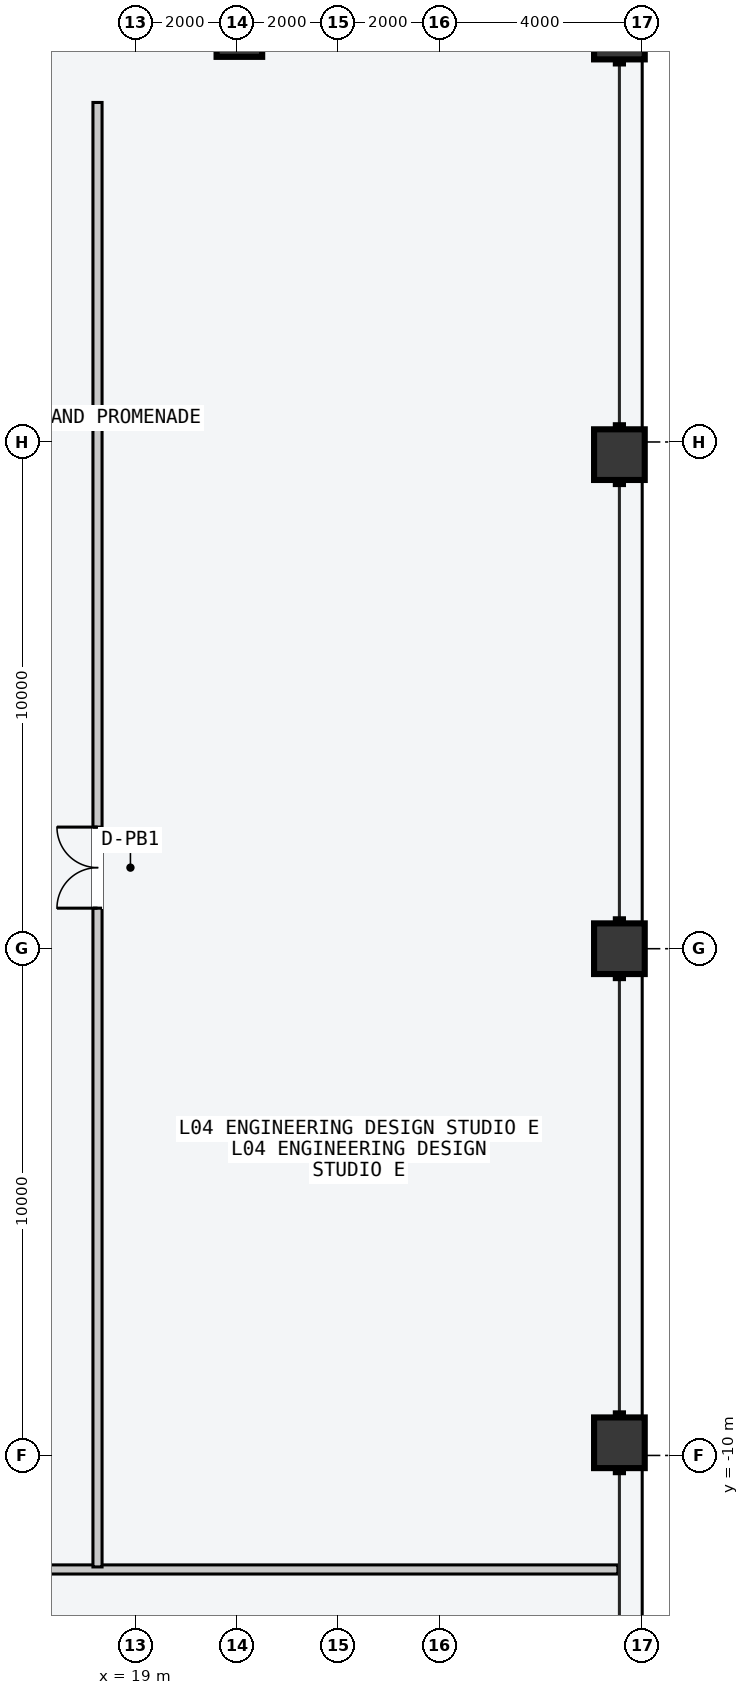
"""IFC4 building model, lengths in metres.
Left out: names, types, materials, properties, quantities, classifications, styles, units other than length and angle.
Written with IfcOpenShell. Run it as: python <this file> out.ifc"""

import sys

from ifc_helpers import new_model, si_unit, direction, frame, frame_2d, origin, origin_2d, place, context, subcontext, project, spatial, rectangle, hollow_rectangle, extrude, element, fill, save


model = new_model("IFC4")
c1 = context("Model", 3, precision=1e-05, world=origin(), true_north=direction((0.0, 1.0)))
c2 = subcontext(c1, "Body", "Model", "MODEL_VIEW")
j1 = project(units=[si_unit("LENGTHUNIT", "METRE"), si_unit("PLANEANGLEUNIT", "RADIAN")], contexts=[c1])
p1 = place(None, origin())
s1 = spatial("IfcSite", under=j1, at=p1, CompositionType="ELEMENT")
p2 = place(p1, origin())
s2 = spatial("IfcBuilding", under=s1, at=p2, CompositionType="ELEMENT")
p3 = place(p2, frame((0.0, 0.0, 19.2)))
s3 = spatial("IfcBuildingStorey", under=s2, at=p3, CompositionType="ELEMENT", Elevation=19.2)
p4 = place(p3, frame((21.05, 18.05, 0.0), z_axis=(0.0, 0.0, 1.0), x_axis=(1.0, 0.0, 0.0)))
e1 = element("IfcColumn", 1, at=p4, inside=s3, PredefinedType="COLUMN", context=c2, shape_type="SweptSolid", body=[
    extrude(hollow_rectangle(XDim=0.9, YDim=0.9, WallThickness=0.045, at=origin_2d()), origin(), (0.0, 0.0, 1.0), 4.8),
])
for number, where, z_axis, x_axis in (
    (2, (28.55, -9.75, 0.0), (0.0, 0.0, 1.0), (0.0, 1.0, 0.0)),
    (3, (28.55, 0.0, 0.0), (0.0, 0.0, 1.0), (0.0, 1.0, 0.0)),
    (4, (28.55, 9.75, 0.0), (0.0, 0.0, 1.0), (0.0, 1.0, 0.0)),
    (5, (28.55, 18.05, 0.0), (0.0, 0.0, 1.0), (0.0, 1.0, 0.0)),
):
    element("IfcColumn", number, at=place(p3, frame(where, z_axis=z_axis, x_axis=x_axis)), inside=s3, PredefinedType="COLUMN", context=c2, shape_type="SweptSolid", body=[
        extrude(hollow_rectangle(XDim=1.0, YDim=1.0, WallThickness=0.05, at=origin_2d()), origin(), (0.0, 0.0, 1.0), 4.8),
    ])
p5 = place(p3, frame((-28.52, -12.25, 0.0), z_axis=(0.0, 0.0, 1.0), x_axis=(1.0, 0.0, 0.0)))
e6 = element("IfcWall", 6, at=p5, inside=s3, PredefinedType="PARTITIONING", context=c2, shape_type="SweptSolid", body=[
    extrude(rectangle(XDim=57.04, YDim=0.18, at=frame_2d((28.52, 0.0))), origin(), (0.0, 0.0, 1.0), 4.6),
])
p6 = place(p5, frame((11.52, 0.0, 0.0)))
e7 = element("IfcOpeningElement", 7, at=p6, cuts=e6, PredefinedType="OPENING", context=c2, shape_type="SweptSolid", body=[
    extrude(rectangle(XDim=1.6, YDim=2.3, at=frame_2d((0.8, 1.15))), frame((0.0, 0.1, 0.0), z_axis=(0.0, -1.0, 0.0), x_axis=(1.0, 0.0, 0.0)), (0.0, 0.0, 1.0), 0.2),
])
p7 = place(p5, frame((20.59, 0.0, 0.0)))
e8 = element("IfcOpeningElement", 8, at=p7, cuts=e6, PredefinedType="OPENING", context=c2, shape_type="SweptSolid", body=[
    extrude(rectangle(XDim=1.6, YDim=2.3, at=frame_2d((0.8, 1.15))), frame((0.0, 0.1, 0.0), z_axis=(0.0, -1.0, 0.0), x_axis=(1.0, 0.0, 0.0)), (0.0, 0.0, 1.0), 0.2),
])
p8 = place(p5, frame((34.85, 0.0, 0.0)))
e9 = element("IfcOpeningElement", 9, at=p8, cuts=e6, PredefinedType="OPENING", context=c2, shape_type="SweptSolid", body=[
    extrude(rectangle(XDim=1.6, YDim=2.3, at=frame_2d((0.8, 1.15))), frame((0.0, 0.1, 0.0), z_axis=(0.0, -1.0, 0.0), x_axis=(1.0, 0.0, 0.0)), (0.0, 0.0, 1.0), 0.2),
])
p9 = place(p5, frame((43.92, 0.0, 0.0)))
e10 = element("IfcOpeningElement", 10, at=p9, cuts=e6, PredefinedType="OPENING", context=c2, shape_type="SweptSolid", body=[
    extrude(rectangle(XDim=1.6, YDim=2.3, at=frame_2d((0.8, 1.15))), frame((0.0, 0.1, 0.0), z_axis=(0.0, -1.0, 0.0), x_axis=(1.0, 0.0, 0.0)), (0.0, 0.0, 1.0), 0.2),
])
p10 = place(p3, frame((18.25, -12.2, 0.0), z_axis=(0.0, 0.0, 1.0), x_axis=(0.0, 1.0, 0.0)))
e11 = element("IfcWall", 11, at=p10, inside=s3, PredefinedType="PARTITIONING", context=c2, shape_type="SweptSolid", body=[
    extrude(rectangle(XDim=28.9, YDim=0.18, at=frame_2d((14.45, 0.0))), origin(), (0.0, 0.0, 1.0), 4.6),
])
p11 = place(p10, frame((13.0, 0.0, 0.0)))
e12 = element("IfcOpeningElement", 12, at=p11, cuts=e11, PredefinedType="OPENING", context=c2, shape_type="SweptSolid", body=[
    extrude(rectangle(XDim=1.6, YDim=2.3, at=frame_2d((0.8, 1.15))), frame((0.0, 0.1, 0.0), z_axis=(0.0, -1.0, 0.0), x_axis=(1.0, 0.0, 0.0)), (0.0, 0.0, 1.0), 0.2),
])
p12 = place(p11, origin())
e13 = element("IfcDoor", 13, at=p12, inside=s3, OperationType="DOUBLE_DOOR_SINGLE_SWING", PredefinedType="DOOR", context=c2, shape_type="SweptSolid", body=[
    extrude(rectangle(XDim=1.6, YDim=2.3, at=frame_2d((0.8, 1.15))), frame((0.0, 0.025, 0.0), z_axis=(0.0, -1.0, 0.0), x_axis=(1.0, 0.0, 0.0)), (0.0, 0.0, 1.0), 0.05),
])
fill(e12, e13)
save(model, sys.argv[1])
